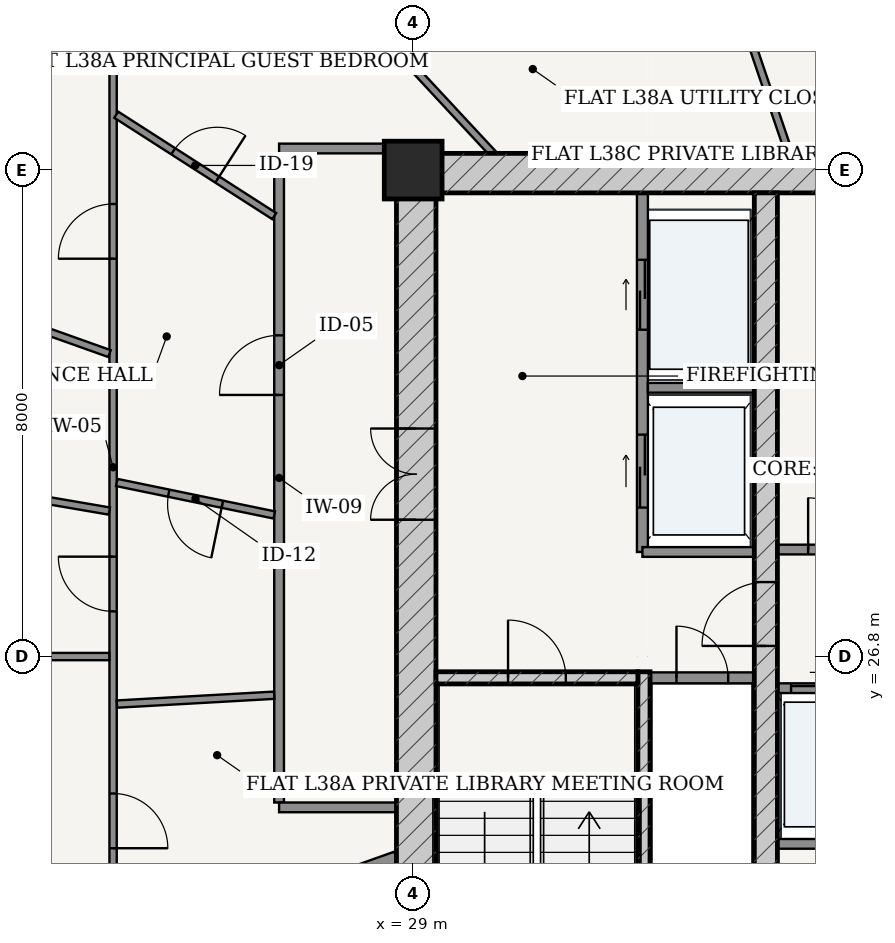
"""IFC4 building model, lengths in metres.
Left out: names, types, materials, properties, quantities, classifications, styles, units other than length and angle.
Written with IfcOpenShell. Run it as: python <this file> out.ifc"""

import sys

from ifc_helpers import new_model, si_unit, direction, frame, frame_2d, origin, origin_2d, place, context, subcontext, project, spatial, rectangle, extrude, source, transform, mapped, element, fill, save


model = new_model("IFC4")
c1 = context("Model", 3, precision=1e-05, world=origin(), true_north=direction((-0.2419218956, 0.970295726276)))
c2 = subcontext(c1, "Body", "Model", "MODEL_VIEW")
j1 = project(units=[si_unit("LENGTHUNIT", "METRE"), si_unit("PLANEANGLEUNIT", "RADIAN")], contexts=[c1])
p1 = place(None, origin())
s1 = spatial("IfcSite", under=j1, at=p1, CompositionType="ELEMENT")
p2 = place(p1, origin())
s2 = spatial("IfcBuilding", under=s1, at=p2, CompositionType="ELEMENT")
p3 = place(p2, frame((0.0, 0.0, 146.2)))
s3 = spatial("IfcBuildingStorey", under=s2, at=p3, CompositionType="ELEMENT", Elevation=146.2)
p4 = place(p3, frame((29.0, 34.8, 0.0), z_axis=(0.0, 0.0, 1.0), x_axis=(1.0, 0.0, 0.0)))
e1 = element("IfcColumn", 1, at=p4, inside=s3, PredefinedType="COLUMN", context=c2, shape_type="SweptSolid", body=[
    extrude(rectangle(XDim=0.95, YDim=0.95, at=origin_2d()), origin(), (0.0, 0.0, 1.0), 3.6),
])
p5 = place(p3, frame((28.725, 34.75, 0.0), z_axis=(0.0, 0.0, 1.0), x_axis=(1.0, 0.0, 0.0)))
e2 = element("IfcWall", 2, at=p5, inside=s3, PredefinedType="SHEAR", context=c2, shape_type="SweptSolid", body=[
    extrude(rectangle(XDim=18.55, YDim=0.65, at=frame_2d((9.275, 0.0))), origin(), (0.0, 0.0, 1.0), 3.33),
])
p6 = place(p3, frame((29.05, 19.175, 0.0), z_axis=(0.0, 0.0, 1.0), x_axis=(0.0, 1.0, 0.0)))
e3 = element("IfcWall", 3, at=p6, inside=s3, PredefinedType="SHEAR", context=c2, shape_type="SweptSolid", body=[
    extrude(rectangle(XDim=15.25, YDim=0.65, at=frame_2d((7.625, 0.0))), origin(), (0.0, 0.0, 1.0), 3.33),
])
p7 = place(p6, frame((9.875, 0.0, 0.0)))
e4 = element("IfcOpeningElement", 4, at=p7, cuts=e3, PredefinedType="OPENING", context=c2, shape_type="SweptSolid", body=[
    extrude(rectangle(XDim=1.5, YDim=2.2, at=frame_2d((0.75, 1.1))), frame((0.0, 0.335, 0.0), z_axis=(0.0, -1.0, 0.0), x_axis=(1.0, 0.0, 0.0)), (0.0, 0.0, 1.0), 0.67),
])
p8 = place(p3, frame((32.795, 19.175, 0.0), z_axis=(0.0, 0.0, 1.0), x_axis=(0.0, 1.0, 0.0)))
e5 = element("IfcWall", 5, at=p8, inside=s3, PredefinedType="SOLIDWALL", context=c2, shape_type="SweptSolid", body=[
    extrude(rectangle(XDim=7.375, YDim=0.2, at=frame_2d((3.688, 0.0))), origin(), (0.0, 0.0, 1.0), 3.33),
])
p9 = place(p3, frame((29.375, 26.45, 0.0), z_axis=(0.0, 0.0, 1.0), x_axis=(1.0, 0.0, 0.0)))
e6 = element("IfcWall", 6, at=p9, inside=s3, PredefinedType="SOLIDWALL", context=c2, shape_type="SweptSolid", body=[
    extrude(rectangle(XDim=3.32, YDim=0.2, at=frame_2d((1.66, 0.0))), origin(), (0.0, 0.0, 1.0), 3.33),
])
p10 = place(p9, frame((1.185, 0.0, 0.0)))
e7 = element("IfcOpeningElement", 7, at=p10, cuts=e6, PredefinedType="OPENING", context=c2, shape_type="SweptSolid", body=[
    extrude(rectangle(XDim=0.95, YDim=2.15, at=frame_2d((0.475, 1.075))), frame((0.0, 0.11, 0.0), z_axis=(0.0, -1.0, 0.0), x_axis=(1.0, 0.0, 0.0)), (0.0, 0.0, 1.0), 0.22),
])
p11 = place(p3, frame((34.8, 19.175, 0.0), z_axis=(0.0, 0.0, 1.0), x_axis=(0.0, 1.0, 0.0)))
e8 = element("IfcWall", 8, at=p11, inside=s3, PredefinedType="SHEAR", context=c2, shape_type="SweptSolid", body=[
    extrude(rectangle(XDim=15.25, YDim=0.38, at=frame_2d((7.625, 0.0))), origin(), (0.0, 0.0, 1.0), 3.33),
])
p12 = place(p11, frame((7.8, 0.0, 0.0)))
e9 = element("IfcOpeningElement", 9, at=p12, cuts=e8, PredefinedType="OPENING", context=c2, shape_type="SweptSolid", body=[
    extrude(rectangle(XDim=1.05, YDim=2.15, at=frame_2d((0.525, 1.075))), frame((0.0, 0.2, 0.0), z_axis=(0.0, -1.0, 0.0), x_axis=(1.0, 0.0, 0.0)), (0.0, 0.0, 1.0), 0.4),
])
p13 = place(p3, frame((32.9, 26.45, 0.0), z_axis=(0.0, 0.0, 1.0), x_axis=(1.0, 0.0, 0.0)))
e10 = element("IfcWall", 10, at=p13, inside=s3, PredefinedType="PARTITIONING", context=c2, shape_type="SweptSolid", body=[
    extrude(rectangle(XDim=1.71, YDim=0.18, at=frame_2d((0.855, 0.0))), origin(), (0.0, 0.0, 1.0), 3.33),
])
p14 = place(p13, frame((0.43, 0.0, 0.0)))
e11 = element("IfcOpeningElement", 11, at=p14, cuts=e10, PredefinedType="OPENING", context=c2, shape_type="SweptSolid", body=[
    extrude(rectangle(XDim=0.85, YDim=2.1, at=frame_2d((0.425, 1.05))), frame((0.0, 0.1, 0.0), z_axis=(0.0, -1.0, 0.0), x_axis=(1.0, 0.0, 0.0)), (0.0, 0.0, 1.0), 0.2),
])
p15 = place(p3, frame((32.77, 28.52, 0.0), z_axis=(0.0, 0.0, 1.0), x_axis=(0.0, 1.0, 0.0)))
e12 = element("IfcWall", 12, at=p15, inside=s3, PredefinedType="PARTITIONING", context=c2, shape_type="SweptSolid", body=[
    extrude(rectangle(XDim=5.905, YDim=0.18, at=frame_2d((2.953, 0.0))), origin(), (0.0, 0.0, 1.0), 3.33),
])
p16 = place(p15, frame((3.655, 0.0, 0.0)))
e13 = element("IfcOpeningElement", 13, at=p16, cuts=e12, PredefinedType="OPENING", context=c2, shape_type="SweptSolid", body=[
    extrude(rectangle(XDim=1.15, YDim=2.2, at=frame_2d((0.575, 1.1))), frame((0.0, 0.1, 0.0), z_axis=(0.0, -1.0, 0.0), x_axis=(1.0, 0.0, 0.0)), (0.0, 0.0, 1.0), 0.2),
])
p17 = place(p15, frame((0.73, 0.0, 0.0)))
e14 = element("IfcOpeningElement", 14, at=p17, cuts=e12, PredefinedType="OPENING", context=c2, shape_type="SweptSolid", body=[
    extrude(rectangle(XDim=1.2, YDim=2.25, at=frame_2d((0.6, 1.125))), frame((0.0, 0.1, 0.0), z_axis=(0.0, -1.0, 0.0), x_axis=(1.0, 0.0, 0.0)), (0.0, 0.0, 1.0), 0.2),
])
p18 = place(p3, frame((32.86, 31.22, 0.0), z_axis=(0.0, 0.0, 1.0), x_axis=(1.0, 0.0, 0.0)))
e15 = element("IfcWall", 15, at=p18, inside=s3, PredefinedType="PARTITIONING", context=c2, shape_type="SweptSolid", body=[
    extrude(rectangle(XDim=1.75, YDim=0.16, at=frame_2d((0.875, 0.0))), origin(), (0.0, 0.0, 1.0), 3.33),
])
p19 = place(p3, frame((32.77, 28.52, 0.0), z_axis=(0.0, 0.0, 1.0), x_axis=(1.0, 0.0, 0.0)))
e16 = element("IfcWall", 16, at=p19, inside=s3, PredefinedType="PARTITIONING", context=c2, shape_type="SweptSolid", body=[
    extrude(rectangle(XDim=1.84, YDim=0.16, at=frame_2d((0.92, 0.0))), origin(), (0.0, 0.0, 1.0), 3.33),
])
p20 = place(p3, frame((34.99, 28.56, 0.0), z_axis=(0.0, 0.0, 1.0), x_axis=(1.0, 0.0, 0.0)))
e17 = element("IfcWall", 17, at=p20, inside=s3, PredefinedType="PARTITIONING", context=c2, shape_type="SweptSolid", body=[
    extrude(rectangle(XDim=6.02, YDim=0.16, at=frame_2d((3.01, 0.0))), origin(), (0.0, 0.0, 1.0), 3.33),
])
p21 = place(p20, frame((0.505, 0.0, 0.0)))
e18 = element("IfcOpeningElement", 18, at=p21, cuts=e17, PredefinedType="OPENING", context=c2, shape_type="SweptSolid", body=[
    extrude(rectangle(XDim=0.85, YDim=2.1, at=frame_2d((0.425, 1.05))), frame((0.0, 0.09, 0.0), z_axis=(0.0, -1.0, 0.0), x_axis=(1.0, 0.0, 0.0)), (0.0, 0.0, 1.0), 0.18),
])
p22 = place(p20, frame((2.58, 0.0, 0.0)))
e19 = element("IfcOpeningElement", 19, at=p22, cuts=e17, PredefinedType="OPENING", context=c2, shape_type="SweptSolid", body=[
    extrude(rectangle(XDim=0.86, YDim=2.1, at=frame_2d((0.43, 1.05))), frame((0.0, 0.09, 0.0), z_axis=(0.0, -1.0, 0.0), x_axis=(1.0, 0.0, 0.0)), (0.0, 0.0, 1.0), 0.18),
])
p23 = place(p20, frame((4.665, 0.0, 0.0)))
e20 = element("IfcOpeningElement", 20, at=p23, cuts=e17, PredefinedType="OPENING", context=c2, shape_type="SweptSolid", body=[
    extrude(rectangle(XDim=0.85, YDim=2.1, at=frame_2d((0.425, 1.05))), frame((0.0, 0.09, 0.0), z_axis=(0.0, -1.0, 0.0), x_axis=(1.0, 0.0, 0.0)), (0.0, 0.0, 1.0), 0.18),
])
p24 = place(p3, frame((34.99, 26.28, 0.0), z_axis=(0.0, 0.0, 1.0), x_axis=(1.0, 0.0, 0.0)))
e21 = element("IfcWall", 21, at=p24, inside=s3, PredefinedType="PARTITIONING", context=c2, shape_type="SweptSolid", body=[
    extrude(rectangle(XDim=6.02, YDim=0.16, at=frame_2d((3.01, 0.0))), origin(), (0.0, 0.0, 1.0), 3.33),
])
p25 = place(p24, frame((0.225, 0.0, 0.0)))
e22 = element("IfcOpeningElement", 22, at=p25, cuts=e21, PredefinedType="OPENING", context=c2, shape_type="SweptSolid", body=[
    extrude(rectangle(XDim=1.1, YDim=2.2, at=frame_2d((0.55, 1.1))), frame((0.0, 0.09, 0.0), z_axis=(0.0, -1.0, 0.0), x_axis=(1.0, 0.0, 0.0)), (0.0, 0.0, 1.0), 0.18),
])
p26 = place(p24, frame((1.705, 0.0, 0.0)))
e23 = element("IfcOpeningElement", 23, at=p26, cuts=e21, PredefinedType="OPENING", context=c2, shape_type="SweptSolid", body=[
    extrude(rectangle(XDim=1.1, YDim=2.2, at=frame_2d((0.55, 1.1))), frame((0.0, 0.09, 0.0), z_axis=(0.0, -1.0, 0.0), x_axis=(1.0, 0.0, 0.0)), (0.0, 0.0, 1.0), 0.18),
])
p27 = place(p3, frame((34.99, 23.72, 0.0), z_axis=(0.0, 0.0, 1.0), x_axis=(1.0, 0.0, 0.0)))
e24 = element("IfcWall", 24, at=p27, inside=s3, PredefinedType="PARTITIONING", context=c2, shape_type="SweptSolid", body=[
    extrude(rectangle(XDim=6.02, YDim=0.16, at=frame_2d((3.01, 0.0))), origin(), (0.0, 0.0, 1.0), 3.33),
])
p28 = place(p3, frame((26.795, 24.4, 0.0), z_axis=(0.0, 0.0, 1.0), x_axis=(0.0, 1.0, 0.0)))
e25 = element("IfcWall", 25, at=p28, inside=s3, PredefinedType="PARTITIONING", context=c2, shape_type="SweptSolid", body=[
    extrude(rectangle(XDim=10.675, YDim=0.16, at=frame_2d((5.337, 0.0))), origin(), (0.0, 0.0, 1.0), 2.776),
])
p29 = place(p28, frame((6.702, 0.0, 0.0)))
e26 = element("IfcOpeningElement", 26, at=p29, cuts=e25, PredefinedType="OPENING", context=c2, shape_type="SweptSolid", body=[
    extrude(rectangle(XDim=0.98, YDim=2.2, at=frame_2d((0.49, 1.1))), frame((0.0, 0.09, 0.0), z_axis=(0.0, -1.0, 0.0), x_axis=(1.0, 0.0, 0.0)), (0.0, 0.0, 1.0), 0.18),
])
p30 = place(p3, frame((26.795, 35.155, 0.0), z_axis=(0.0, 0.0, 1.0), x_axis=(1.0, 0.0, 0.0)))
e27 = element("IfcWall", 27, at=p30, inside=s3, PredefinedType="PARTITIONING", context=c2, shape_type="SweptSolid", body=[
    extrude(rectangle(XDim=1.93, YDim=0.16, at=frame_2d((0.965, 0.0))), origin(), (0.0, 0.0, 1.0), 2.776),
])
p31 = place(p3, frame((26.795, 24.32, 0.0), z_axis=(0.0, 0.0, 1.0), x_axis=(1.0, 0.0, 0.0)))
e28 = element("IfcWall", 28, at=p31, inside=s3, PredefinedType="PARTITIONING", context=c2, shape_type="SweptSolid", body=[
    extrude(rectangle(XDim=1.93, YDim=0.16, at=frame_2d((0.965, 0.0))), origin(), (0.0, 0.0, 1.0), 3.33),
])
p32 = place(p3, frame((24.065, 21.941, 0.0), z_axis=(0.0, 0.0, 1.0), x_axis=(0.0, 1.0, 0.0)))
e29 = element("IfcWall", 29, at=p32, inside=s3, PredefinedType="PARTITIONING", context=c2, shape_type="SweptSolid", body=[
    extrude(rectangle(XDim=15.944, YDim=0.12, at=frame_2d((7.972, 0.0))), origin(), (0.0, 0.0, 1.0), 2.776),
])
p33 = place(p32, frame((5.602, 0.0, 0.0)))
e30 = element("IfcOpeningElement", 30, at=p33, cuts=e29, PredefinedType="OPENING", context=c2, shape_type="SweptSolid", body=[
    extrude(rectangle(XDim=0.9, YDim=2.15, at=frame_2d((0.45, 1.075))), frame((0.0, 0.07, 0.0), z_axis=(0.0, -1.0, 0.0), x_axis=(1.0, 0.0, 0.0)), (0.0, 0.0, 1.0), 0.14),
])
p34 = place(p32, frame((1.707, 0.0, 0.0)))
e31 = element("IfcOpeningElement", 31, at=p34, cuts=e29, PredefinedType="OPENING", context=c2, shape_type="SweptSolid", body=[
    extrude(rectangle(XDim=0.9, YDim=2.15, at=frame_2d((0.45, 1.075))), frame((0.0, 0.07, 0.0), z_axis=(0.0, -1.0, 0.0), x_axis=(1.0, 0.0, 0.0)), (0.0, 0.0, 1.0), 0.14),
])
p35 = place(p32, frame((11.402, 0.0, 0.0)))
e32 = element("IfcOpeningElement", 32, at=p35, cuts=e29, PredefinedType="OPENING", context=c2, shape_type="SweptSolid", body=[
    extrude(rectangle(XDim=0.9, YDim=2.15, at=frame_2d((0.45, 1.075))), frame((0.0, 0.07, 0.0), z_axis=(0.0, -1.0, 0.0), x_axis=(1.0, 0.0, 0.0)), (0.0, 0.0, 1.0), 0.14),
])
p36 = place(p3, frame((24.007, 31.782, 0.0), z_axis=(0.0, 0.0, 1.0), x_axis=(-0.942077868165, 0.335394231187, 0.0)))
e33 = element("IfcWall", 33, at=p36, inside=s3, PredefinedType="PARTITIONING", context=c2, shape_type="SweptSolid", body=[
    extrude(rectangle(XDim=8.817, YDim=0.12, at=frame_2d((4.408, 0.0))), origin(), (0.0, 0.0, 1.0), 2.846),
])
p37 = place(p36, frame((3.958, 0.0, 0.0)))
e34 = element("IfcOpeningElement", 34, at=p37, cuts=e33, PredefinedType="OPENING", context=c2, shape_type="SweptSolid", body=[
    extrude(rectangle(XDim=0.9, YDim=2.15, at=frame_2d((0.45, 1.075))), frame((0.0, 0.07, 0.0), z_axis=(0.0, -1.0, 0.0), x_axis=(1.0, 0.0, 0.0)), (0.0, 0.0, 1.0), 0.14),
])
p38 = place(p3, frame((24.004, 29.193, 0.0), z_axis=(0.0, 0.0, 1.0), x_axis=(-0.985698378271, 0.168519159369, 0.0)))
e35 = element("IfcWall", 35, at=p38, inside=s3, PredefinedType="PARTITIONING", context=c2, shape_type="SweptSolid", body=[
    extrude(rectangle(XDim=9.769, YDim=0.12, at=frame_2d((4.884, 0.0))), origin(), (0.0, 0.0, 1.0), 2.776),
])
p39 = place(p3, frame((24.003, 26.8, 0.0), z_axis=(0.0, 0.0, 1.0), x_axis=(-1.0, 0.0, 0.0)))
e36 = element("IfcWall", 36, at=p39, inside=s3, PredefinedType="PARTITIONING", context=c2, shape_type="SweptSolid", body=[
    extrude(rectangle(XDim=10.143, YDim=0.12, at=frame_2d((5.071, 0.0))), origin(), (0.0, 0.0, 1.0), 2.846),
])
p40 = place(p39, frame((4.622, 0.0, 0.0)))
e37 = element("IfcOpeningElement", 37, at=p40, cuts=e36, PredefinedType="OPENING", context=c2, shape_type="SweptSolid", body=[
    extrude(rectangle(XDim=0.9, YDim=2.15, at=frame_2d((0.45, 1.075))), frame((0.0, 0.07, 0.0), z_axis=(0.0, -1.0, 0.0), x_axis=(1.0, 0.0, 0.0)), (0.0, 0.0, 1.0), 0.14),
])
p41 = place(p3, frame((35.182, 35.075, 0.0), z_axis=(0.0, 0.0, 1.0), x_axis=(-0.322321614946, 0.946630221649, 0.0)))
e38 = element("IfcWall", 38, at=p41, inside=s3, PredefinedType="PARTITIONING", context=c2, shape_type="SweptSolid", body=[
    extrude(rectangle(XDim=2.737, YDim=0.12, at=frame_2d((1.369, 0.0))), origin(), (0.0, 0.0, 1.0), 2.415),
])
p42 = place(p3, frame((30.307, 35.075, 0.0), z_axis=(0.0, 0.0, 1.0), x_axis=(-0.68082810609, 0.732443233267, 0.0)))
e39 = element("IfcWall", 39, at=p42, inside=s3, PredefinedType="PARTITIONING", context=c2, shape_type="SweptSolid", body=[
    extrude(rectangle(XDim=3.775, YDim=0.12, at=frame_2d((1.887, 0.0))), origin(), (0.0, 0.0, 1.0), 2.776),
])
p43 = place(p3, frame((26.715, 34.043, 0.0), z_axis=(0.0, 0.0, 1.0), x_axis=(-0.841597086151, 0.540105864235, 0.0)))
e40 = element("IfcWall", 40, at=p43, inside=s3, PredefinedType="PARTITIONING", context=c2, shape_type="SweptSolid", body=[
    extrude(rectangle(XDim=3.087, YDim=0.12, at=frame_2d((1.543, 0.0))), origin(), (0.0, 0.0, 1.0), 3.005),
])
p44 = place(p43, frame((1.113, 0.0, 0.0)))
e41 = element("IfcOpeningElement", 41, at=p44, cuts=e40, PredefinedType="OPENING", context=c2, shape_type="SweptSolid", body=[
    extrude(rectangle(XDim=0.86, YDim=2.15, at=frame_2d((0.43, 1.075))), frame((0.0, 0.07, 0.0), z_axis=(0.0, -1.0, 0.0), x_axis=(1.0, 0.0, 0.0)), (0.0, 0.0, 1.0), 0.14),
])
p45 = place(p3, frame((26.715, 29.129, 0.0), z_axis=(0.0, 0.0, 1.0), x_axis=(-0.979376501526, 0.202043728582, 0.0)))
e42 = element("IfcWall", 42, at=p45, inside=s3, PredefinedType="PARTITIONING", context=c2, shape_type="SweptSolid", body=[
    extrude(rectangle(XDim=2.644, YDim=0.12, at=frame_2d((1.322, 0.0))), origin(), (0.0, 0.0, 1.0), 3.33),
])
p46 = place(p45, frame((0.872, 0.0, 0.0)))
e43 = element("IfcOpeningElement", 43, at=p46, cuts=e42, PredefinedType="OPENING", context=c2, shape_type="SweptSolid", body=[
    extrude(rectangle(XDim=0.9, YDim=2.15, at=frame_2d((0.45, 1.075))), frame((0.0, 0.07, 0.0), z_axis=(0.0, -1.0, 0.0), x_axis=(1.0, 0.0, 0.0)), (0.0, 0.0, 1.0), 0.14),
])
p47 = place(p3, frame((26.715, 26.164, 0.0), z_axis=(0.0, 0.0, 1.0), x_axis=(-0.998418047295, -0.056226353574, 0.0)))
e44 = element("IfcWall", 44, at=p47, inside=s3, PredefinedType="PARTITIONING", context=c2, shape_type="SweptSolid", body=[
    extrude(rectangle(XDim=2.592, YDim=0.12, at=frame_2d((1.296, 0.0))), origin(), (0.0, 0.0, 1.0), 3.33),
])
p48 = place(p3, frame((28.723, 23.497, 0.0), z_axis=(0.0, 0.0, 1.0), x_axis=(-0.942077095572, -0.335396401292, 0.0)))
e45 = element("IfcWall", 45, at=p48, inside=s3, PredefinedType="PARTITIONING", context=c2, shape_type="SweptSolid", body=[
    extrude(rectangle(XDim=13.823, YDim=0.2, at=frame_2d((6.912, 0.0))), origin(), (0.0, 0.0, 1.0), 2.846),
])
m1 = source(origin(), c2, "Body", "SweptSolid", [
    extrude(rectangle(XDim=1.5, YDim=2.2, at=frame_2d((0.75, 1.1))), frame((0.0, 0.025, 0.0), z_axis=(0.0, -1.0, 0.0), x_axis=(1.0, 0.0, 0.0)), (0.0, 0.0, 1.0), 0.05),
])
p49 = place(p7, origin())
e46 = element("IfcDoor", 46, at=p49, inside=s3, OperationType="DOUBLE_DOOR_SINGLE_SWING", PredefinedType="DOOR", context=c2, shape_type="MappedRepresentation", body=[
    mapped(m1, transform((0.0, 0.0, 0.0), scale=1.0)),
])
fill(e4, e46)
m2 = source(origin(), c2, "Body", "SweptSolid", [
    extrude(rectangle(XDim=1.05, YDim=2.15, at=frame_2d((0.525, 1.075))), frame((0.0, 0.025, 0.0), z_axis=(0.0, -1.0, 0.0), x_axis=(1.0, 0.0, 0.0)), (0.0, 0.0, 1.0), 0.05),
])
p50 = place(p12, origin())
e47 = element("IfcDoor", 47, at=p50, inside=s3, OperationType="SINGLE_SWING_LEFT", PredefinedType="DOOR", context=c2, shape_type="MappedRepresentation", body=[
    mapped(m2, transform((0.0, 0.0, 0.0), scale=1.0)),
])
fill(e9, e47)
m3 = source(origin(), c2, "Body", "SweptSolid", [
    extrude(rectangle(XDim=0.95, YDim=2.15, at=frame_2d((0.475, 1.075))), frame((0.0, 0.025, 0.0), z_axis=(0.0, -1.0, 0.0), x_axis=(1.0, 0.0, 0.0)), (0.0, 0.0, 1.0), 0.05),
])
p51 = place(p10, origin())
e48 = element("IfcDoor", 48, at=p51, inside=s3, OperationType="SINGLE_SWING_LEFT", PredefinedType="DOOR", context=c2, shape_type="MappedRepresentation", body=[
    mapped(m3, transform((0.0, 0.0, 0.0), scale=1.0)),
])
fill(e7, e48)
m4 = source(origin(), c2, "Body", "SweptSolid", [
    extrude(rectangle(XDim=0.85, YDim=2.1, at=frame_2d((0.425, 1.05))), frame((0.0, 0.025, 0.0), z_axis=(0.0, -1.0, 0.0), x_axis=(1.0, 0.0, 0.0)), (0.0, 0.0, 1.0), 0.05),
])
p52 = place(p14, origin())
e49 = element("IfcDoor", 49, at=p52, inside=s3, OperationType="SINGLE_SWING_LEFT", PredefinedType="DOOR", context=c2, shape_type="MappedRepresentation", body=[
    mapped(m4, transform((0.0, 0.0, 0.0), scale=1.0)),
])
fill(e11, e49)
p53 = place(p21, origin())
e50 = element("IfcDoor", 50, at=p53, inside=s3, OperationType="SINGLE_SWING_LEFT", PredefinedType="DOOR", context=c2, shape_type="MappedRepresentation", body=[
    mapped(m4, transform((0.0, 0.0, 0.0), scale=1.0)),
])
fill(e18, e50)
m5 = source(origin(), c2, "Body", "SweptSolid", [
    extrude(rectangle(XDim=1.15, YDim=2.2, at=frame_2d((0.575, 1.1))), frame((0.0, 0.025, 0.0), z_axis=(0.0, -1.0, 0.0), x_axis=(1.0, 0.0, 0.0)), (0.0, 0.0, 1.0), 0.05),
])
p54 = place(p16, origin())
e51 = element("IfcDoor", 51, at=p54, inside=s3, OperationType="DOUBLE_DOOR_SLIDING", PredefinedType="DOOR", context=c2, shape_type="MappedRepresentation", body=[
    mapped(m5, transform((0.0, 0.0, 0.0), scale=1.0)),
])
fill(e13, e51)
m6 = source(origin(), c2, "Body", "SweptSolid", [
    extrude(rectangle(XDim=1.2, YDim=2.25, at=frame_2d((0.6, 1.125))), frame((0.0, 0.025, 0.0), z_axis=(0.0, -1.0, 0.0), x_axis=(1.0, 0.0, 0.0)), (0.0, 0.0, 1.0), 0.05),
])
p55 = place(p17, origin())
e52 = element("IfcDoor", 52, at=p55, inside=s3, OperationType="DOUBLE_DOOR_SLIDING", PredefinedType="DOOR", context=c2, shape_type="MappedRepresentation", body=[
    mapped(m6, transform((0.0, 0.0, 0.0), scale=1.0)),
])
fill(e14, e52)
m7 = source(origin(), c2, "Body", "SweptSolid", [
    extrude(rectangle(XDim=1.1, YDim=2.2, at=frame_2d((0.55, 1.1))), frame((0.0, 0.025, 0.0), z_axis=(0.0, -1.0, 0.0), x_axis=(1.0, 0.0, 0.0)), (0.0, 0.0, 1.0), 0.05),
])
p56 = place(p25, origin())
e53 = element("IfcDoor", 53, at=p56, inside=s3, OperationType="DOUBLE_DOOR_SLIDING", PredefinedType="DOOR", context=c2, shape_type="MappedRepresentation", body=[
    mapped(m7, transform((0.0, 0.0, 0.0), scale=1.0)),
])
fill(e22, e53)
m8 = source(origin(), c2, "Body", "SweptSolid", [
    extrude(rectangle(XDim=0.98, YDim=2.2, at=frame_2d((0.49, 1.1))), frame((0.0, 0.025, 0.0), z_axis=(0.0, -1.0, 0.0), x_axis=(1.0, 0.0, 0.0)), (0.0, 0.0, 1.0), 0.05),
])
p57 = place(p29, origin())
e54 = element("IfcDoor", 54, at=p57, inside=s3, OperationType="SINGLE_SWING_LEFT", PredefinedType="DOOR", context=c2, shape_type="MappedRepresentation", body=[
    mapped(m8, transform((0.0, 0.0, 0.0), scale=1.0)),
])
fill(e26, e54)
m9 = source(origin(), c2, "Body", "SweptSolid", [
    extrude(rectangle(XDim=0.86, YDim=2.15, at=frame_2d((0.43, 1.075))), frame((0.0, 0.025, 0.0), z_axis=(0.0, -1.0, 0.0), x_axis=(1.0, 0.0, 0.0)), (0.0, 0.0, 1.0), 0.05),
])
p58 = place(p44, frame((0.86, 0.0, 0.0), z_axis=(0.0, 0.0, 1.0), x_axis=(-1.0, 0.0, 0.0)))
e55 = element("IfcDoor", 55, at=p58, inside=s3, OperationType="SINGLE_SWING_RIGHT", PredefinedType="DOOR", context=c2, shape_type="MappedRepresentation", body=[
    mapped(m9, transform((0.0, 0.0, 0.0), scale=1.0)),
])
fill(e41, e55)
m10 = source(origin(), c2, "Body", "SweptSolid", [
    extrude(rectangle(XDim=0.9, YDim=2.15, at=frame_2d((0.45, 1.075))), frame((0.0, 0.025, 0.0), z_axis=(0.0, -1.0, 0.0), x_axis=(1.0, 0.0, 0.0)), (0.0, 0.0, 1.0), 0.05),
])
p59 = place(p46, origin())
e56 = element("IfcDoor", 56, at=p59, inside=s3, OperationType="SINGLE_SWING_LEFT", PredefinedType="DOOR", context=c2, shape_type="MappedRepresentation", body=[
    mapped(m10, transform((0.0, 0.0, 0.0), scale=1.0)),
])
fill(e43, e56)
p60 = place(p33, origin())
e57 = element("IfcDoor", 57, at=p60, inside=s3, OperationType="SINGLE_SWING_RIGHT", PredefinedType="DOOR", context=c2, shape_type="MappedRepresentation", body=[
    mapped(m10, transform((0.0, 0.0, 0.0), scale=1.0)),
])
fill(e30, e57)
p61 = place(p34, frame((0.9, 0.0, 0.0), z_axis=(0.0, 0.0, 1.0), x_axis=(-1.0, 0.0, 0.0)))
e58 = element("IfcDoor", 58, at=p61, inside=s3, OperationType="SINGLE_SWING_RIGHT", PredefinedType="DOOR", context=c2, shape_type="MappedRepresentation", body=[
    mapped(m10, transform((0.0, 0.0, 0.0), scale=1.0)),
])
fill(e31, e58)
p62 = place(p35, origin())
e59 = element("IfcDoor", 59, at=p62, inside=s3, OperationType="SINGLE_SWING_LEFT", PredefinedType="DOOR", context=c2, shape_type="MappedRepresentation", body=[
    mapped(m10, transform((0.0, 0.0, 0.0), scale=1.0)),
])
fill(e32, e59)
save(model, sys.argv[1])
